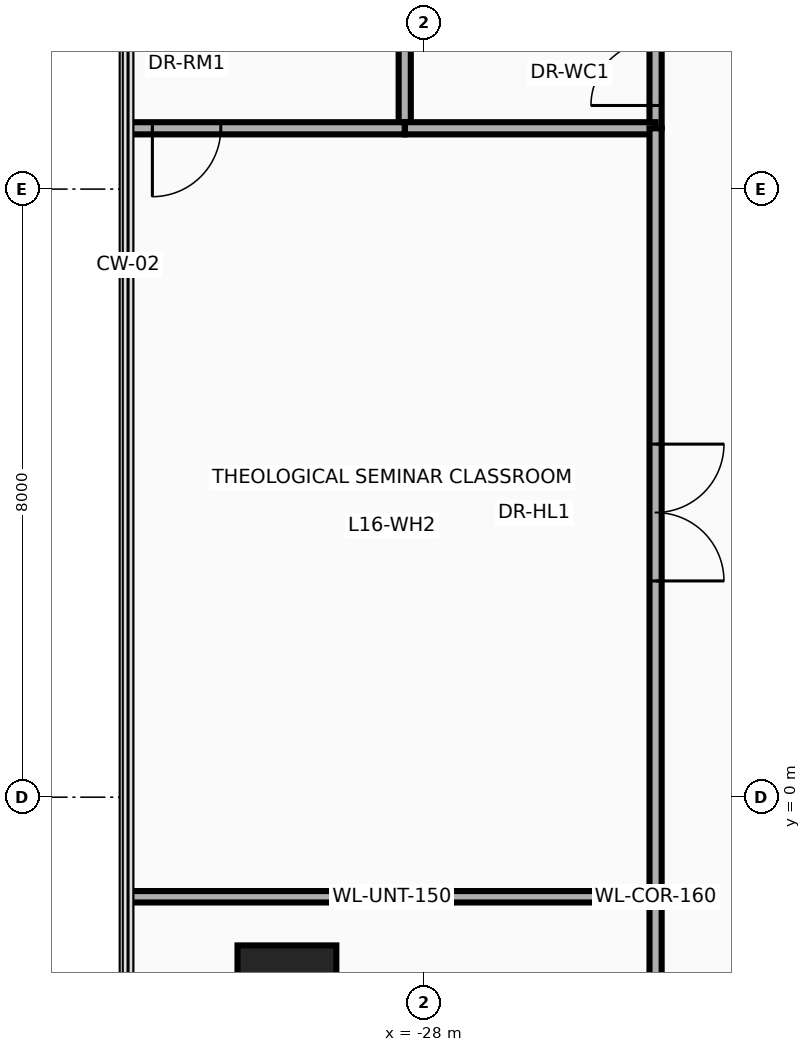
"""IFC4 building model, lengths in metres.
Left out: names, types, materials, properties, quantities, classifications, styles, units other than length and angle.
Written with IfcOpenShell. Run it as: python <this file> out.ifc"""

import sys

from ifc_helpers import new_model, si_unit, direction, frame, frame_2d, origin, origin_2d, place, context, subcontext, project, spatial, rectangle, circle, extrude, source, transform, mapped, element, fill, save


model = new_model("IFC4")
c1 = context("Model", 3, precision=1e-05, world=origin(), true_north=direction((0.0, 1.0)))
c2 = subcontext(c1, "Body", "Model", "MODEL_VIEW")
j1 = project(units=[si_unit("LENGTHUNIT", "METRE"), si_unit("PLANEANGLEUNIT", "RADIAN")], contexts=[c1])
p1 = place(None, origin())
s1 = spatial("IfcSite", under=j1, at=p1, CompositionType="ELEMENT")
p2 = place(p1, origin())
s2 = spatial("IfcBuilding", under=s1, at=p2, CompositionType="ELEMENT")
p3 = place(p2, frame((0.0, 0.0, 66.7)))
s3 = spatial("IfcBuildingStorey", under=s2, at=p3, CompositionType="ELEMENT", Elevation=66.7)
m1 = source(origin(), c2, "Body", "SweptSolid", [
    extrude(circle(Radius=0.65, at=origin_2d()), origin(), (0.0, 0.0, 1.0), 3.7),
])
p4 = place(p3, frame((-29.8, -2.6, 0.0), z_axis=(0.0, 0.0, 1.0), x_axis=(1.0, 0.0, 0.0)))
e1 = element("IfcColumn", 1, at=p4, inside=s3, PredefinedType="COLUMN", context=c2, shape_type="MappedRepresentation", body=[
    mapped(m1, transform((0.0, 0.0, 0.0), x_axis=(1.0, 0.0, 0.0), y_axis=(0.0, 1.0, 0.0), z_axis=(0.0, 0.0, 1.0), scale=1.0)),
])
p5 = place(p3, frame((-28.25, 8.8, 0.0), z_axis=(0.0, 0.0, 1.0), x_axis=(0.0, 1.0, 0.0)))
e2 = element("IfcWall", 2, at=p5, inside=s3, PredefinedType="PARTITIONING", context=c2, shape_type="SweptSolid", body=[
    extrude(rectangle(XDim=2.6, YDim=0.16, at=frame_2d((1.3, 0.0))), origin(), (0.0, 0.0, 1.0), 2.583),
])
p6 = place(p3, frame((-24.95, 8.8, 0.0), z_axis=(0.0, 0.0, 1.0), x_axis=(0.0, 1.0, 0.0)))
e3 = element("IfcWall", 3, at=p6, inside=s3, PredefinedType="PARTITIONING", context=c2, shape_type="SweptSolid", body=[
    extrude(rectangle(XDim=2.6, YDim=0.16, at=frame_2d((1.3, 0.0))), origin(), (0.0, 0.0, 1.0), 2.583),
])
p7 = place(p6, frame((0.3, 0.0, 0.0)))
e4 = element("IfcOpeningElement", 4, at=p7, cuts=e3, PredefinedType="OPENING", context=c2, shape_type="SweptSolid", body=[
    extrude(rectangle(XDim=0.85, YDim=2.1, at=frame_2d((0.425, 1.05))), frame((0.0, 0.095, 0.0), z_axis=(0.0, -1.0, 0.0), x_axis=(1.0, 0.0, 0.0)), (0.0, 0.0, 1.0), 0.19),
])
p8 = place(p6, frame((1.45, 0.0, 0.0)))
e5 = element("IfcOpeningElement", 5, at=p8, cuts=e3, PredefinedType="OPENING", context=c2, shape_type="SweptSolid", body=[
    extrude(rectangle(XDim=0.85, YDim=2.1, at=frame_2d((0.425, 1.05))), frame((0.0, 0.095, 0.0), z_axis=(0.0, -1.0, 0.0), x_axis=(1.0, 0.0, 0.0)), (0.0, 0.0, 1.0), 0.19),
])
p9 = place(p3, frame((-28.25, 8.8, 0.0), z_axis=(0.0, 0.0, 1.0), x_axis=(1.0, 0.0, 0.0)))
e6 = element("IfcWall", 6, at=p9, inside=s3, PredefinedType="PARTITIONING", context=c2, shape_type="SweptSolid", body=[
    extrude(rectangle(XDim=3.3, YDim=0.16, at=frame_2d((1.65, 0.0))), origin(), (0.0, 0.0, 1.0), 3.46),
])
p10 = place(p3, frame((-24.95, -11.42, 0.0), z_axis=(0.0, 0.0, 1.0), x_axis=(0.0, 1.0, 0.0)))
e7 = element("IfcWall", 7, at=p10, inside=s3, PredefinedType="PARTITIONING", context=c2, shape_type="SweptSolid", body=[
    extrude(rectangle(XDim=20.22, YDim=0.16, at=frame_2d((10.11, 0.0))), origin(), (0.0, 0.0, 1.0), 2.583),
])
p11 = place(p10, frame((4.155, 0.0, 0.0)))
e8 = element("IfcOpeningElement", 8, at=p11, cuts=e7, PredefinedType="OPENING", context=c2, shape_type="SweptSolid", body=[
    extrude(rectangle(XDim=1.8, YDim=2.15, at=frame_2d((0.9, 1.075))), frame((0.0, 0.095, 0.0), z_axis=(0.0, -1.0, 0.0), x_axis=(1.0, 0.0, 0.0)), (0.0, 0.0, 1.0), 0.19),
])
p12 = place(p10, frame((14.265, 0.0, 0.0)))
e9 = element("IfcOpeningElement", 9, at=p12, cuts=e7, PredefinedType="OPENING", context=c2, shape_type="SweptSolid", body=[
    extrude(rectangle(XDim=1.8, YDim=2.15, at=frame_2d((0.9, 1.075))), frame((0.0, 0.095, 0.0), z_axis=(0.0, -1.0, 0.0), x_axis=(1.0, 0.0, 0.0)), (0.0, 0.0, 1.0), 0.19),
])
p13 = place(p3, frame((-31.89, 8.8, 0.0), z_axis=(0.0, 0.0, 1.0), x_axis=(1.0, 0.0, 0.0)))
e10 = element("IfcWall", 10, at=p13, inside=s3, PredefinedType="PARTITIONING", context=c2, shape_type="SweptSolid", body=[
    extrude(rectangle(XDim=3.64, YDim=0.16, at=frame_2d((1.82, 0.0))), origin(), (0.0, 0.0, 1.0), 2.896),
])
p14 = place(p13, frame((0.32, 0.0, 0.0)))
e11 = element("IfcOpeningElement", 11, at=p14, cuts=e10, PredefinedType="OPENING", context=c2, shape_type="SweptSolid", body=[
    extrude(rectangle(XDim=0.9, YDim=2.1, at=frame_2d((0.45, 1.05))), frame((0.0, 0.095, 0.0), z_axis=(0.0, -1.0, 0.0), x_axis=(1.0, 0.0, 0.0)), (0.0, 0.0, 1.0), 0.19),
])
p15 = place(p3, frame((-31.89, -1.31, 0.0), z_axis=(0.0, 0.0, 1.0), x_axis=(1.0, 0.0, 0.0)))
e12 = element("IfcWall", 12, at=p15, inside=s3, PredefinedType="PARTITIONING", context=c2, shape_type="SweptSolid", body=[
    extrude(rectangle(XDim=6.94, YDim=0.15, at=frame_2d((3.47, 0.0))), origin(), (0.0, 0.0, 1.0), 2.896),
])
p16 = place(p7, origin())
e13 = element("IfcDoor", 13, at=p16, inside=s3, OperationType="SINGLE_SWING_LEFT", PredefinedType="DOOR", context=c2, shape_type="SweptSolid", body=[
    extrude(rectangle(XDim=0.85, YDim=2.1, at=frame_2d((0.425, 1.05))), frame((0.0, 0.025, 0.0), z_axis=(0.0, -1.0, 0.0), x_axis=(1.0, 0.0, 0.0)), (0.0, 0.0, 1.0), 0.05),
])
fill(e4, e13)
p17 = place(p14, frame((0.9, 0.0, 0.0), z_axis=(0.0, 0.0, 1.0), x_axis=(-1.0, 0.0, 0.0)))
e14 = element("IfcDoor", 14, at=p17, inside=s3, OperationType="SINGLE_SWING_LEFT", PredefinedType="DOOR", context=c2, shape_type="SweptSolid", body=[
    extrude(rectangle(XDim=0.9, YDim=2.1, at=frame_2d((0.45, 1.05))), frame((0.0, 0.025, 0.0), z_axis=(0.0, -1.0, 0.0), x_axis=(1.0, 0.0, 0.0)), (0.0, 0.0, 1.0), 0.05),
])
fill(e11, e14)
p18 = place(p12, frame((1.8, 0.0, 0.0), z_axis=(0.0, 0.0, 1.0), x_axis=(-1.0, 0.0, 0.0)))
e15 = element("IfcDoor", 15, at=p18, inside=s3, OperationType="DOUBLE_DOOR_SINGLE_SWING", PredefinedType="DOOR", context=c2, shape_type="SweptSolid", body=[
    extrude(rectangle(XDim=1.8, YDim=2.15, at=frame_2d((0.9, 1.075))), frame((0.0, 0.025, 0.0), z_axis=(0.0, -1.0, 0.0), x_axis=(1.0, 0.0, 0.0)), (0.0, 0.0, 1.0), 0.05),
])
fill(e9, e15)
save(model, sys.argv[1])
